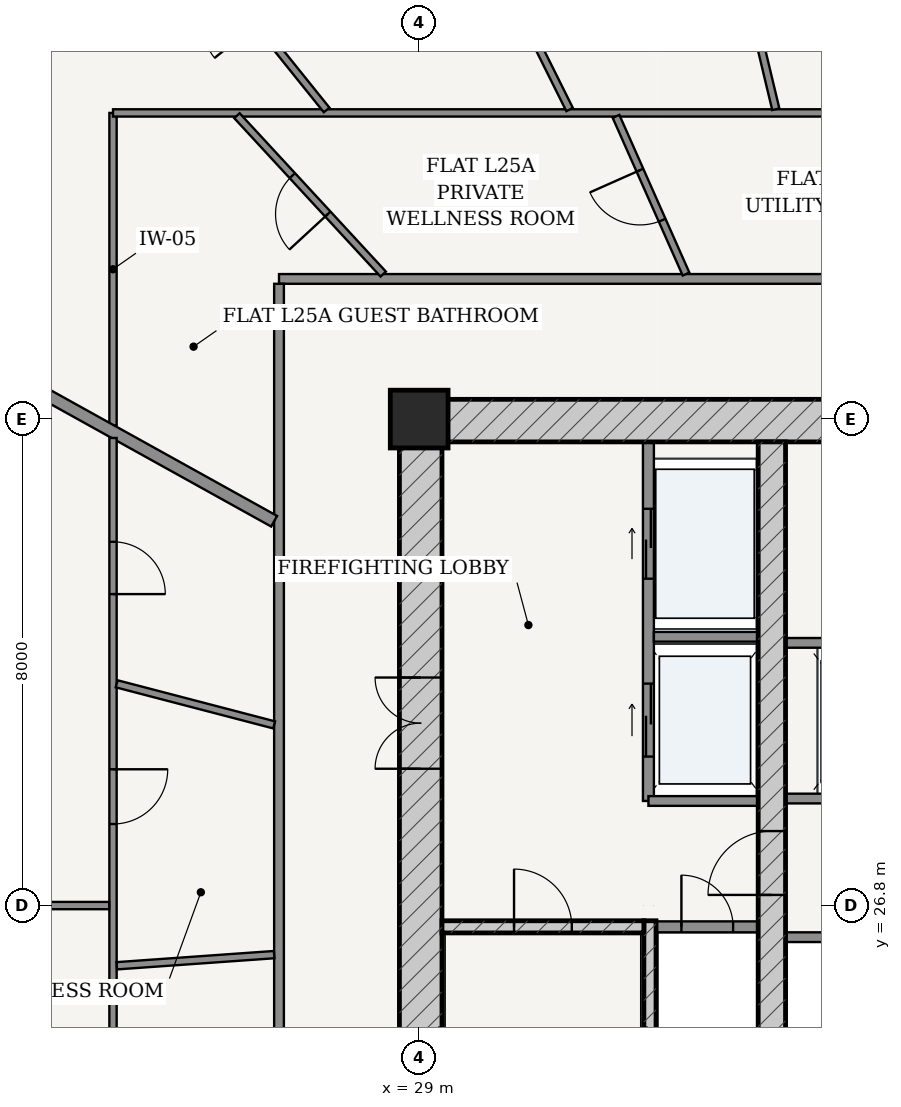
"""IFC4 building model, lengths in metres.
Left out: names, types, materials, properties, quantities, classifications, styles, units other than length and angle.
Written with IfcOpenShell. Run it as: python <this file> out.ifc"""

import sys

from ifc_helpers import new_model, si_unit, direction, frame, frame_2d, origin, origin_2d, place, context, subcontext, project, spatial, rectangle, extrude, source, transform, mapped, element, fill, save


model = new_model("IFC4")
c1 = context("Model", 3, precision=1e-05, world=origin(), true_north=direction((-0.2419218956, 0.970295726276)))
c2 = subcontext(c1, "Body", "Model", "MODEL_VIEW")
j1 = project(units=[si_unit("LENGTHUNIT", "METRE"), si_unit("PLANEANGLEUNIT", "RADIAN")], contexts=[c1])
p1 = place(None, origin())
s1 = spatial("IfcSite", under=j1, at=p1, CompositionType="ELEMENT")
p2 = place(p1, origin())
s2 = spatial("IfcBuilding", under=s1, at=p2, CompositionType="ELEMENT")
p3 = place(p2, frame((0.0, 0.0, 97.8)))
s3 = spatial("IfcBuildingStorey", under=s2, at=p3, CompositionType="ELEMENT", Elevation=97.8)
p4 = place(p3, frame((29.0, 34.8, 0.0), z_axis=(0.0, 0.0, 1.0), x_axis=(1.0, 0.0, 0.0)))
e1 = element("IfcColumn", 1, at=p4, inside=s3, PredefinedType="COLUMN", context=c2, shape_type="SweptSolid", body=[
    extrude(rectangle(XDim=0.95, YDim=0.95, at=origin_2d()), origin(), (0.0, 0.0, 1.0), 3.6),
])
p5 = place(p3, frame((28.675, 34.775, 0.0), z_axis=(0.0, 0.0, 1.0), x_axis=(1.0, 0.0, 0.0)))
e2 = element("IfcWall", 2, at=p5, inside=s3, PredefinedType="SHEAR", context=c2, shape_type="SweptSolid", body=[
    extrude(rectangle(XDim=18.65, YDim=0.7, at=frame_2d((9.325, 0.0))), origin(), (0.0, 0.0, 1.0), 3.325),
])
p6 = place(p5, frame((8.9, 0.0, 0.0)))
e3 = element("IfcOpeningElement", 3, at=p6, cuts=e2, PredefinedType="OPENING", context=c2, shape_type="SweptSolid", body=[
    extrude(rectangle(XDim=0.85, YDim=2.1, at=frame_2d((0.425, 1.05))), frame((0.0, 0.36, 0.0), z_axis=(0.0, -1.0, 0.0), x_axis=(1.0, 0.0, 0.0)), (0.0, 0.0, 1.0), 0.72),
])
p7 = place(p3, frame((29.025, 19.175, 0.0), z_axis=(0.0, 0.0, 1.0), x_axis=(0.0, 1.0, 0.0)))
e4 = element("IfcWall", 4, at=p7, inside=s3, PredefinedType="SHEAR", context=c2, shape_type="SweptSolid", body=[
    extrude(rectangle(XDim=15.25, YDim=0.7, at=frame_2d((7.625, 0.0))), origin(), (0.0, 0.0, 1.0), 3.325),
])
p8 = place(p7, frame((9.875, 0.0, 0.0)))
e5 = element("IfcOpeningElement", 5, at=p8, cuts=e4, PredefinedType="OPENING", context=c2, shape_type="SweptSolid", body=[
    extrude(rectangle(XDim=1.5, YDim=2.2, at=frame_2d((0.75, 1.1))), frame((0.0, 0.36, 0.0), z_axis=(0.0, -1.0, 0.0), x_axis=(1.0, 0.0, 0.0)), (0.0, 0.0, 1.0), 0.72),
])
p9 = place(p3, frame((32.795, 19.175, 0.0), z_axis=(0.0, 0.0, 1.0), x_axis=(0.0, 1.0, 0.0)))
e6 = element("IfcWall", 6, at=p9, inside=s3, PredefinedType="SOLIDWALL", context=c2, shape_type="SweptSolid", body=[
    extrude(rectangle(XDim=7.375, YDim=0.2, at=frame_2d((3.688, 0.0))), origin(), (0.0, 0.0, 1.0), 3.325),
])
p10 = place(p3, frame((29.375, 26.45, 0.0), z_axis=(0.0, 0.0, 1.0), x_axis=(1.0, 0.0, 0.0)))
e7 = element("IfcWall", 7, at=p10, inside=s3, PredefinedType="SOLIDWALL", context=c2, shape_type="SweptSolid", body=[
    extrude(rectangle(XDim=3.32, YDim=0.2, at=frame_2d((1.66, 0.0))), origin(), (0.0, 0.0, 1.0), 3.325),
])
p11 = place(p10, frame((1.185, 0.0, 0.0)))
e8 = element("IfcOpeningElement", 8, at=p11, cuts=e7, PredefinedType="OPENING", context=c2, shape_type="SweptSolid", body=[
    extrude(rectangle(XDim=0.95, YDim=2.15, at=frame_2d((0.475, 1.075))), frame((0.0, 0.11, 0.0), z_axis=(0.0, -1.0, 0.0), x_axis=(1.0, 0.0, 0.0)), (0.0, 0.0, 1.0), 0.22),
])
p12 = place(p3, frame((34.8, 19.175, 0.0), z_axis=(0.0, 0.0, 1.0), x_axis=(0.0, 1.0, 0.0)))
e9 = element("IfcWall", 9, at=p12, inside=s3, PredefinedType="SHEAR", context=c2, shape_type="SweptSolid", body=[
    extrude(rectangle(XDim=15.25, YDim=0.45, at=frame_2d((7.625, 0.0))), origin(), (0.0, 0.0, 1.0), 3.325),
])
p13 = place(p12, frame((7.8, 0.0, 0.0)))
e10 = element("IfcOpeningElement", 10, at=p13, cuts=e9, PredefinedType="OPENING", context=c2, shape_type="SweptSolid", body=[
    extrude(rectangle(XDim=1.05, YDim=2.15, at=frame_2d((0.525, 1.075))), frame((0.0, 0.235, 0.0), z_axis=(0.0, -1.0, 0.0), x_axis=(1.0, 0.0, 0.0)), (0.0, 0.0, 1.0), 0.47),
])
p14 = place(p3, frame((32.9, 26.45, 0.0), z_axis=(0.0, 0.0, 1.0), x_axis=(1.0, 0.0, 0.0)))
e11 = element("IfcWall", 11, at=p14, inside=s3, PredefinedType="PARTITIONING", context=c2, shape_type="SweptSolid", body=[
    extrude(rectangle(XDim=1.675, YDim=0.18, at=frame_2d((0.837, 0.0))), origin(), (0.0, 0.0, 1.0), 3.325),
])
p15 = place(p14, frame((0.413, 0.0, 0.0)))
e12 = element("IfcOpeningElement", 12, at=p15, cuts=e11, PredefinedType="OPENING", context=c2, shape_type="SweptSolid", body=[
    extrude(rectangle(XDim=0.85, YDim=2.1, at=frame_2d((0.425, 1.05))), frame((0.0, 0.1, 0.0), z_axis=(0.0, -1.0, 0.0), x_axis=(1.0, 0.0, 0.0)), (0.0, 0.0, 1.0), 0.2),
])
p16 = place(p3, frame((32.77, 28.52, 0.0), z_axis=(0.0, 0.0, 1.0), x_axis=(0.0, 1.0, 0.0)))
e13 = element("IfcWall", 13, at=p16, inside=s3, PredefinedType="PARTITIONING", context=c2, shape_type="SweptSolid", body=[
    extrude(rectangle(XDim=5.905, YDim=0.18, at=frame_2d((2.953, 0.0))), origin(), (0.0, 0.0, 1.0), 3.325),
])
p17 = place(p16, frame((3.655, 0.0, 0.0)))
e14 = element("IfcOpeningElement", 14, at=p17, cuts=e13, PredefinedType="OPENING", context=c2, shape_type="SweptSolid", body=[
    extrude(rectangle(XDim=1.15, YDim=2.2, at=frame_2d((0.575, 1.1))), frame((0.0, 0.1, 0.0), z_axis=(0.0, -1.0, 0.0), x_axis=(1.0, 0.0, 0.0)), (0.0, 0.0, 1.0), 0.2),
])
p18 = place(p16, frame((0.73, 0.0, 0.0)))
e15 = element("IfcOpeningElement", 15, at=p18, cuts=e13, PredefinedType="OPENING", context=c2, shape_type="SweptSolid", body=[
    extrude(rectangle(XDim=1.2, YDim=2.25, at=frame_2d((0.6, 1.125))), frame((0.0, 0.1, 0.0), z_axis=(0.0, -1.0, 0.0), x_axis=(1.0, 0.0, 0.0)), (0.0, 0.0, 1.0), 0.2),
])
p19 = place(p3, frame((32.86, 31.22, 0.0), z_axis=(0.0, 0.0, 1.0), x_axis=(1.0, 0.0, 0.0)))
e16 = element("IfcWall", 16, at=p19, inside=s3, PredefinedType="PARTITIONING", context=c2, shape_type="SweptSolid", body=[
    extrude(rectangle(XDim=1.715, YDim=0.16, at=frame_2d((0.857, 0.0))), origin(), (0.0, 0.0, 1.0), 3.325),
])
p20 = place(p3, frame((32.77, 28.52, 0.0), z_axis=(0.0, 0.0, 1.0), x_axis=(1.0, 0.0, 0.0)))
e17 = element("IfcWall", 17, at=p20, inside=s3, PredefinedType="PARTITIONING", context=c2, shape_type="SweptSolid", body=[
    extrude(rectangle(XDim=1.805, YDim=0.16, at=frame_2d((0.902, 0.0))), origin(), (0.0, 0.0, 1.0), 3.325),
])
p21 = place(p3, frame((35.025, 28.56, 0.0), z_axis=(0.0, 0.0, 1.0), x_axis=(1.0, 0.0, 0.0)))
e18 = element("IfcWall", 18, at=p21, inside=s3, PredefinedType="PARTITIONING", context=c2, shape_type="SweptSolid", body=[
    extrude(rectangle(XDim=5.95, YDim=0.16, at=frame_2d((2.975, 0.0))), origin(), (0.0, 0.0, 1.0), 3.325),
])
p22 = place(p21, frame((0.76, 0.0, 0.0)))
e19 = element("IfcOpeningElement", 19, at=p22, cuts=e18, PredefinedType="OPENING", context=c2, shape_type="SweptSolid", body=[
    extrude(rectangle(XDim=1.1, YDim=2.2, at=frame_2d((0.55, 1.1))), frame((0.0, 0.09, 0.0), z_axis=(0.0, -1.0, 0.0), x_axis=(1.0, 0.0, 0.0)), (0.0, 0.0, 1.0), 0.18),
])
p23 = place(p21, frame((2.425, 0.0, 0.0)))
e20 = element("IfcOpeningElement", 20, at=p23, cuts=e18, PredefinedType="OPENING", context=c2, shape_type="SweptSolid", body=[
    extrude(rectangle(XDim=1.1, YDim=2.2, at=frame_2d((0.55, 1.1))), frame((0.0, 0.09, 0.0), z_axis=(0.0, -1.0, 0.0), x_axis=(1.0, 0.0, 0.0)), (0.0, 0.0, 1.0), 0.18),
])
p24 = place(p21, frame((4.09, 0.0, 0.0)))
e21 = element("IfcOpeningElement", 21, at=p24, cuts=e18, PredefinedType="OPENING", context=c2, shape_type="SweptSolid", body=[
    extrude(rectangle(XDim=1.1, YDim=2.2, at=frame_2d((0.55, 1.1))), frame((0.0, 0.09, 0.0), z_axis=(0.0, -1.0, 0.0), x_axis=(1.0, 0.0, 0.0)), (0.0, 0.0, 1.0), 0.18),
])
for number, where, z_axis, x_axis in (
    (22, (35.025, 31.12, 0.0), (0.0, 0.0, 1.0), (1.0, 0.0, 0.0)),
    (23, (35.025, 26.28, 0.0), (0.0, 0.0, 1.0), (1.0, 0.0, 0.0)),
):
    element("IfcWall", number, at=place(p3, frame(where, z_axis=z_axis, x_axis=x_axis)), inside=s3, PredefinedType="PARTITIONING", context=c2, shape_type="SweptSolid", body=[
        extrude(rectangle(XDim=5.95, YDim=0.16, at=frame_2d((2.975, 0.0))), origin(), (0.0, 0.0, 1.0), 3.325),
    ])
p25 = place(p3, frame((26.695, 37.105, 0.0), z_axis=(0.0, 0.0, 1.0), x_axis=(1.0, 0.0, 0.0)))
e24 = element("IfcWall", 24, at=p25, inside=s3, PredefinedType="PARTITIONING", context=c2, shape_type="SweptSolid", body=[
    extrude(rectangle(XDim=22.61, YDim=0.16, at=frame_2d((11.305, 0.0))), origin(), (0.0, 0.0, 1.0), 2.767),
])
p26 = place(p25, frame((18.058, 0.0, 0.0)))
e25 = element("IfcOpeningElement", 25, at=p26, cuts=e24, PredefinedType="OPENING", context=c2, shape_type="SweptSolid", body=[
    extrude(rectangle(XDim=0.98, YDim=2.2, at=frame_2d((0.49, 1.1))), frame((0.0, 0.09, 0.0), z_axis=(0.0, -1.0, 0.0), x_axis=(1.0, 0.0, 0.0)), (0.0, 0.0, 1.0), 0.18),
])
p27 = place(p3, frame((26.695, 16.575, 0.0), z_axis=(0.0, 0.0, 1.0), x_axis=(0.0, 1.0, 0.0)))
e26 = element("IfcWall", 26, at=p27, inside=s3, PredefinedType="PARTITIONING", context=c2, shape_type="SweptSolid", body=[
    extrude(rectangle(XDim=20.45, YDim=0.16, at=frame_2d((10.225, 0.0))), origin(), (0.0, 0.0, 1.0), 2.767),
])
p28 = place(p3, frame((23.965, 34.693, 0.0), z_axis=(0.0, 0.0, 1.0), x_axis=(0.0, 1.0, 0.0)))
e27 = element("IfcWall", 27, at=p28, inside=s3, PredefinedType="PARTITIONING", context=c2, shape_type="SweptSolid", body=[
    extrude(rectangle(XDim=5.142, YDim=0.12, at=frame_2d((2.571, 0.0))), origin(), (0.0, 0.0, 1.0), 3.004),
])
p29 = place(p3, frame((23.965, 39.835, 0.0), z_axis=(0.0, 0.0, 1.0), x_axis=(1.0, 0.0, 0.0)))
e28 = element("IfcWall", 28, at=p29, inside=s3, PredefinedType="PARTITIONING", context=c2, shape_type="SweptSolid", body=[
    extrude(rectangle(XDim=28.07, YDim=0.12, at=frame_2d((14.035, 0.0))), origin(), (0.0, 0.0, 1.0), 2.767),
])
p30 = place(p29, frame((23.442, 0.0, 0.0)))
e29 = element("IfcOpeningElement", 29, at=p30, cuts=e28, PredefinedType="OPENING", context=c2, shape_type="SweptSolid", body=[
    extrude(rectangle(XDim=0.9, YDim=2.15, at=frame_2d((0.45, 1.075))), frame((0.0, 0.07, 0.0), z_axis=(0.0, -1.0, 0.0), x_axis=(1.0, 0.0, 0.0)), (0.0, 0.0, 1.0), 0.14),
])
p31 = place(p3, frame((34.865, 39.895, 0.0), z_axis=(0.0, 0.0, 1.0), x_axis=(-0.23282725047, 0.97251810854, 0.0)))
e30 = element("IfcWall", 30, at=p31, inside=s3, PredefinedType="PARTITIONING", context=c2, shape_type="SweptSolid", body=[
    extrude(rectangle(XDim=8.715, YDim=0.12, at=frame_2d((4.357, 0.0))), origin(), (0.0, 0.0, 1.0), 2.767),
])
p32 = place(p31, frame((2.83, 0.0, 0.0)))
e31 = element("IfcOpeningElement", 31, at=p32, cuts=e30, PredefinedType="OPENING", context=c2, shape_type="SweptSolid", body=[
    extrude(rectangle(XDim=0.9, YDim=2.15, at=frame_2d((0.45, 1.075))), frame((0.0, 0.07, 0.0), z_axis=(0.0, -1.0, 0.0), x_axis=(1.0, 0.0, 0.0)), (0.0, 0.0, 1.0), 0.14),
])
p33 = place(p3, frame((31.474, 39.89, 0.0), z_axis=(0.0, 0.0, 1.0), x_axis=(-0.446167584581, 0.894949432353, 0.0)))
e32 = element("IfcWall", 32, at=p33, inside=s3, PredefinedType="PARTITIONING", context=c2, shape_type="SweptSolid", body=[
    extrude(rectangle(XDim=8.125, YDim=0.12, at=frame_2d((4.062, 0.0))), origin(), (0.0, 0.0, 1.0), 2.767),
])
p34 = place(p33, frame((3.612, 0.0, 0.0)))
e33 = element("IfcOpeningElement", 33, at=p34, cuts=e32, PredefinedType="OPENING", context=c2, shape_type="SweptSolid", body=[
    extrude(rectangle(XDim=0.9, YDim=2.15, at=frame_2d((0.45, 1.075))), frame((0.0, 0.07, 0.0), z_axis=(0.0, -1.0, 0.0), x_axis=(1.0, 0.0, 0.0)), (0.0, 0.0, 1.0), 0.14),
])
p35 = place(p3, frame((27.478, 39.883, 0.0), z_axis=(0.0, 0.0, 1.0), x_axis=(-0.62672583251, 0.779239841682, 0.0)))
e34 = element("IfcWall", 34, at=p35, inside=s3, PredefinedType="PARTITIONING", context=c2, shape_type="SweptSolid", body=[
    extrude(rectangle(XDim=6.678, YDim=0.12, at=frame_2d((3.339, 0.0))), origin(), (0.0, 0.0, 1.0), 2.767),
])
p36 = place(p35, frame((1.821, 0.0, 0.0)))
e35 = element("IfcOpeningElement", 35, at=p36, cuts=e34, PredefinedType="OPENING", context=c2, shape_type="SweptSolid", body=[
    extrude(rectangle(XDim=0.9, YDim=2.15, at=frame_2d((0.45, 1.075))), frame((0.0, 0.07, 0.0), z_axis=(0.0, -1.0, 0.0), x_axis=(1.0, 0.0, 0.0)), (0.0, 0.0, 1.0), 0.14),
])
p37 = place(p3, frame((33.389, 37.185, 0.0), z_axis=(0.0, 0.0, 1.0), x_axis=(-0.40585903307, 0.913935689902, 0.0)))
e36 = element("IfcWall", 36, at=p37, inside=s3, PredefinedType="PARTITIONING", context=c2, shape_type="SweptSolid", body=[
    extrude(rectangle(XDim=2.837, YDim=0.12, at=frame_2d((1.419, 0.0))), origin(), (0.0, 0.0, 1.0), 3.325),
])
p38 = place(p37, frame((0.969, 0.0, 0.0)))
e37 = element("IfcOpeningElement", 37, at=p38, cuts=e36, PredefinedType="OPENING", context=c2, shape_type="SweptSolid", body=[
    extrude(rectangle(XDim=0.9, YDim=2.15, at=frame_2d((0.45, 1.075))), frame((0.0, 0.07, 0.0), z_axis=(0.0, -1.0, 0.0), x_axis=(1.0, 0.0, 0.0)), (0.0, 0.0, 1.0), 0.14),
])
p39 = place(p3, frame((28.409, 37.185, 0.0), z_axis=(0.0, 0.0, 1.0), x_axis=(-0.678451695105, 0.734645014554, 0.0)))
e38 = element("IfcWall", 38, at=p39, inside=s3, PredefinedType="PARTITIONING", context=c2, shape_type="SweptSolid", body=[
    extrude(rectangle(XDim=3.545, YDim=0.12, at=frame_2d((1.772, 0.0))), origin(), (0.0, 0.0, 1.0), 2.767),
])
p40 = place(p39, frame((1.343, 0.0, 0.0)))
e39 = element("IfcOpeningElement", 39, at=p40, cuts=e38, PredefinedType="OPENING", context=c2, shape_type="SweptSolid", body=[
    extrude(rectangle(XDim=0.86, YDim=2.15, at=frame_2d((0.43, 1.075))), frame((0.0, 0.07, 0.0), z_axis=(0.0, -1.0, 0.0), x_axis=(1.0, 0.0, 0.0)), (0.0, 0.0, 1.0), 0.14),
])
p41 = place(p3, frame((26.615, 33.12, 0.0), z_axis=(0.0, 0.0, 1.0), x_axis=(-0.874319192772, 0.485351366692, 0.0)))
e40 = element("IfcWall", 40, at=p41, inside=s3, PredefinedType="PARTITIONING", context=c2, shape_type="SweptSolid", body=[
    extrude(rectangle(XDim=12.158, YDim=0.2, at=frame_2d((6.079, 0.0))), origin(), (0.0, 0.0, 1.0), 2.767),
])
p42 = place(p3, frame((23.965, 13.765, 0.0), z_axis=(0.0, 0.0, 1.0), x_axis=(0.0, 1.0, 0.0)))
e41 = element("IfcWall", 41, at=p42, inside=s3, PredefinedType="PARTITIONING", context=c2, shape_type="SweptSolid", body=[
    extrude(rectangle(XDim=20.725, YDim=0.12, at=frame_2d((10.362, 0.0))), origin(), (0.0, 0.0, 1.0), 2.767),
])
p43 = place(p42, frame((9.401, 0.0, 0.0)))
e42 = element("IfcOpeningElement", 42, at=p43, cuts=e41, PredefinedType="OPENING", context=c2, shape_type="SweptSolid", body=[
    extrude(rectangle(XDim=0.9, YDim=2.15, at=frame_2d((0.45, 1.075))), frame((0.0, 0.07, 0.0), z_axis=(0.0, -1.0, 0.0), x_axis=(1.0, 0.0, 0.0)), (0.0, 0.0, 1.0), 0.14),
])
p44 = place(p42, frame((18.157, 0.0, 0.0)))
e43 = element("IfcOpeningElement", 43, at=p44, cuts=e41, PredefinedType="OPENING", context=c2, shape_type="SweptSolid", body=[
    extrude(rectangle(XDim=0.86, YDim=2.15, at=frame_2d((0.43, 1.075))), frame((0.0, 0.07, 0.0), z_axis=(0.0, -1.0, 0.0), x_axis=(1.0, 0.0, 0.0)), (0.0, 0.0, 1.0), 0.14),
])
p45 = place(p42, frame((14.376, 0.0, 0.0)))
e44 = element("IfcOpeningElement", 44, at=p45, cuts=e41, PredefinedType="OPENING", context=c2, shape_type="SweptSolid", body=[
    extrude(rectangle(XDim=0.9, YDim=2.15, at=frame_2d((0.45, 1.075))), frame((0.0, 0.07, 0.0), z_axis=(0.0, -1.0, 0.0), x_axis=(1.0, 0.0, 0.0)), (0.0, 0.0, 1.0), 0.14),
])
p46 = place(p3, frame((23.903, 26.8, 0.0), z_axis=(0.0, 0.0, 1.0), x_axis=(-1.0, 0.0, 0.0)))
e45 = element("IfcWall", 45, at=p46, inside=s3, PredefinedType="PARTITIONING", context=c2, shape_type="SweptSolid", body=[
    extrude(rectangle(XDim=12.443, YDim=0.12, at=frame_2d((6.222, 0.0))), origin(), (0.0, 0.0, 1.0), 2.767),
])
p47 = place(p46, frame((5.771, 0.0, 0.0)))
e46 = element("IfcOpeningElement", 46, at=p47, cuts=e45, PredefinedType="OPENING", context=c2, shape_type="SweptSolid", body=[
    extrude(rectangle(XDim=0.9, YDim=2.15, at=frame_2d((0.45, 1.075))), frame((0.0, 0.07, 0.0), z_axis=(0.0, -1.0, 0.0), x_axis=(1.0, 0.0, 0.0)), (0.0, 0.0, 1.0), 0.14),
])
p48 = place(p3, frame((26.615, 29.771, 0.0), z_axis=(0.0, 0.0, 1.0), x_axis=(-0.967585302816, 0.252544415449, 0.0)))
e47 = element("IfcWall", 47, at=p48, inside=s3, PredefinedType="PARTITIONING", context=c2, shape_type="SweptSolid", body=[
    extrude(rectangle(XDim=2.677, YDim=0.12, at=frame_2d((1.338, 0.0))), origin(), (0.0, 0.0, 1.0), 3.325),
])
p49 = place(p3, frame((26.615, 25.993, 0.0), z_axis=(0.0, 0.0, 1.0), x_axis=(-0.997500084777, -0.070665273433, 0.0)))
e48 = element("IfcWall", 48, at=p49, inside=s3, PredefinedType="PARTITIONING", context=c2, shape_type="SweptSolid", body=[
    extrude(rectangle(XDim=2.595, YDim=0.12, at=frame_2d((1.297, 0.0))), origin(), (0.0, 0.0, 1.0), 3.325),
])
m1 = source(origin(), c2, "Body", "SweptSolid", [
    extrude(rectangle(XDim=1.5, YDim=2.2, at=frame_2d((0.75, 1.1))), frame((0.0, 0.025, 0.0), z_axis=(0.0, -1.0, 0.0), x_axis=(1.0, 0.0, 0.0)), (0.0, 0.0, 1.0), 0.05),
])
p50 = place(p8, origin())
e49 = element("IfcDoor", 49, at=p50, inside=s3, OperationType="DOUBLE_DOOR_SINGLE_SWING", PredefinedType="DOOR", context=c2, shape_type="MappedRepresentation", body=[
    mapped(m1, transform((0.0, 0.0, 0.0), scale=1.0)),
])
fill(e5, e49)
m2 = source(origin(), c2, "Body", "SweptSolid", [
    extrude(rectangle(XDim=1.05, YDim=2.15, at=frame_2d((0.525, 1.075))), frame((0.0, 0.025, 0.0), z_axis=(0.0, -1.0, 0.0), x_axis=(1.0, 0.0, 0.0)), (0.0, 0.0, 1.0), 0.05),
])
p51 = place(p13, origin())
e50 = element("IfcDoor", 50, at=p51, inside=s3, OperationType="SINGLE_SWING_LEFT", PredefinedType="DOOR", context=c2, shape_type="MappedRepresentation", body=[
    mapped(m2, transform((0.0, 0.0, 0.0), scale=1.0)),
])
fill(e10, e50)
m3 = source(origin(), c2, "Body", "SweptSolid", [
    extrude(rectangle(XDim=0.95, YDim=2.15, at=frame_2d((0.475, 1.075))), frame((0.0, 0.025, 0.0), z_axis=(0.0, -1.0, 0.0), x_axis=(1.0, 0.0, 0.0)), (0.0, 0.0, 1.0), 0.05),
])
p52 = place(p11, origin())
e51 = element("IfcDoor", 51, at=p52, inside=s3, OperationType="SINGLE_SWING_LEFT", PredefinedType="DOOR", context=c2, shape_type="MappedRepresentation", body=[
    mapped(m3, transform((0.0, 0.0, 0.0), scale=1.0)),
])
fill(e8, e51)
m4 = source(origin(), c2, "Body", "SweptSolid", [
    extrude(rectangle(XDim=0.85, YDim=2.1, at=frame_2d((0.425, 1.05))), frame((0.0, 0.025, 0.0), z_axis=(0.0, -1.0, 0.0), x_axis=(1.0, 0.0, 0.0)), (0.0, 0.0, 1.0), 0.05),
])
p53 = place(p15, origin())
e52 = element("IfcDoor", 52, at=p53, inside=s3, OperationType="SINGLE_SWING_LEFT", PredefinedType="DOOR", context=c2, shape_type="MappedRepresentation", body=[
    mapped(m4, transform((0.0, 0.0, 0.0), scale=1.0)),
])
fill(e12, e52)
m5 = source(origin(), c2, "Body", "SweptSolid", [
    extrude(rectangle(XDim=1.15, YDim=2.2, at=frame_2d((0.575, 1.1))), frame((0.0, 0.025, 0.0), z_axis=(0.0, -1.0, 0.0), x_axis=(1.0, 0.0, 0.0)), (0.0, 0.0, 1.0), 0.05),
])
p54 = place(p17, origin())
e53 = element("IfcDoor", 53, at=p54, inside=s3, OperationType="DOUBLE_DOOR_SLIDING", PredefinedType="DOOR", context=c2, shape_type="MappedRepresentation", body=[
    mapped(m5, transform((0.0, 0.0, 0.0), scale=1.0)),
])
fill(e14, e53)
m6 = source(origin(), c2, "Body", "SweptSolid", [
    extrude(rectangle(XDim=1.2, YDim=2.25, at=frame_2d((0.6, 1.125))), frame((0.0, 0.025, 0.0), z_axis=(0.0, -1.0, 0.0), x_axis=(1.0, 0.0, 0.0)), (0.0, 0.0, 1.0), 0.05),
])
p55 = place(p18, origin())
e54 = element("IfcDoor", 54, at=p55, inside=s3, OperationType="DOUBLE_DOOR_SLIDING", PredefinedType="DOOR", context=c2, shape_type="MappedRepresentation", body=[
    mapped(m6, transform((0.0, 0.0, 0.0), scale=1.0)),
])
fill(e15, e54)
m7 = source(origin(), c2, "Body", "SweptSolid", [
    extrude(rectangle(XDim=0.9, YDim=2.15, at=frame_2d((0.45, 1.075))), frame((0.0, 0.025, 0.0), z_axis=(0.0, -1.0, 0.0), x_axis=(1.0, 0.0, 0.0)), (0.0, 0.0, 1.0), 0.05),
])
p56 = place(p38, origin())
e55 = element("IfcDoor", 55, at=p56, inside=s3, OperationType="SINGLE_SWING_RIGHT", PredefinedType="DOOR", context=c2, shape_type="MappedRepresentation", body=[
    mapped(m7, transform((0.0, 0.0, 0.0), scale=1.0)),
])
fill(e37, e55)
m8 = source(origin(), c2, "Body", "SweptSolid", [
    extrude(rectangle(XDim=0.86, YDim=2.15, at=frame_2d((0.43, 1.075))), frame((0.0, 0.025, 0.0), z_axis=(0.0, -1.0, 0.0), x_axis=(1.0, 0.0, 0.0)), (0.0, 0.0, 1.0), 0.05),
])
p57 = place(p40, origin())
e56 = element("IfcDoor", 56, at=p57, inside=s3, OperationType="SINGLE_SWING_LEFT", PredefinedType="DOOR", context=c2, shape_type="MappedRepresentation", body=[
    mapped(m8, transform((0.0, 0.0, 0.0), scale=1.0)),
])
fill(e39, e56)
p58 = place(p44, frame((0.86, 0.0, 0.0), z_axis=(0.0, 0.0, 1.0), x_axis=(-1.0, 0.0, 0.0)))
e57 = element("IfcDoor", 57, at=p58, inside=s3, OperationType="SINGLE_SWING_RIGHT", PredefinedType="DOOR", context=c2, shape_type="MappedRepresentation", body=[
    mapped(m8, transform((0.0, 0.0, 0.0), scale=1.0)),
])
fill(e43, e57)
p59 = place(p45, frame((0.9, 0.0, 0.0), z_axis=(0.0, 0.0, 1.0), x_axis=(-1.0, 0.0, 0.0)))
e58 = element("IfcDoor", 58, at=p59, inside=s3, OperationType="SINGLE_SWING_LEFT", PredefinedType="DOOR", context=c2, shape_type="MappedRepresentation", body=[
    mapped(m7, transform((0.0, 0.0, 0.0), scale=1.0)),
])
fill(e44, e58)
save(model, sys.argv[1])
